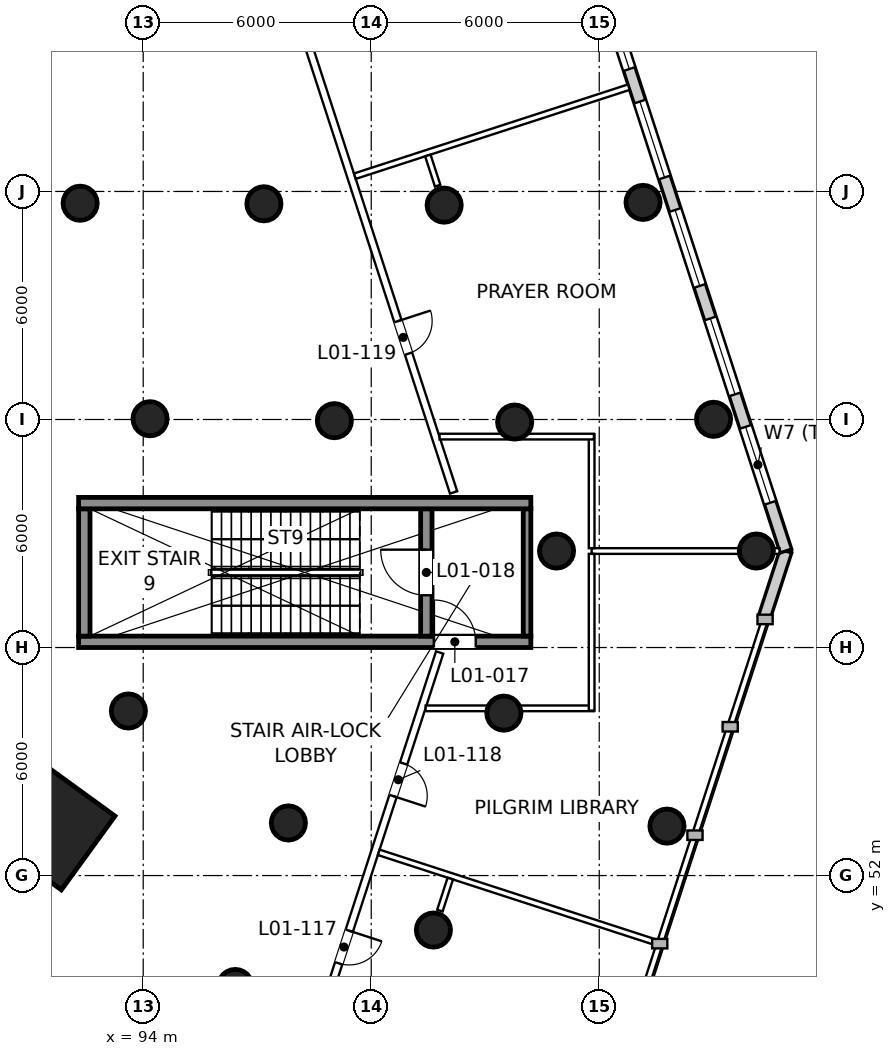
"""IFC4 building model, lengths in metres.
Left out: names, types, materials, properties, quantities, classifications, styles, units other than length and angle.
Written with IfcOpenShell. Run it as: python <this file> out.ifc"""

import sys

from ifc_helpers import new_model, si_unit, direction, frame, frame_2d, origin, origin_2d, place, context, subcontext, project, spatial, rectangle, circle, extrude, element, fill, save


model = new_model("IFC4")
c1 = context("Model", 3, precision=1e-05, world=origin(), true_north=direction((0.0, 1.0)))
c2 = subcontext(c1, "Body", "Model", "MODEL_VIEW")
j1 = project(units=[si_unit("LENGTHUNIT", "METRE"), si_unit("PLANEANGLEUNIT", "RADIAN")], contexts=[c1])
p1 = place(None, origin())
s1 = spatial("IfcSite", under=j1, at=p1, CompositionType="ELEMENT")
p2 = place(p1, origin())
s2 = spatial("IfcBuilding", under=s1, at=p2, CompositionType="ELEMENT")
p3 = place(p2, frame((0.0, 0.0, 9.0)))
s3 = spatial("IfcBuildingStorey", under=s2, at=p3, CompositionType="ELEMENT", Elevation=9.0)
p4 = place(p3, frame((91.58, 53.3, 0.0), z_axis=(0.0, 0.0, 1.0), x_axis=(0.809016994375, -0.587785252292, 0.0)))
e1 = element("IfcColumn", 1, at=p4, inside=s3, PredefinedType="COLUMN", context=c2, shape_type="SweptSolid", body=[
    extrude(rectangle(XDim=2.4, YDim=2.4, at=origin_2d()), origin(), (0.0, 0.0, 1.0), 6.0),
])
for number, where, z_axis, x_axis in (
    (2, (93.61, 56.33, 0.0), (0.0, 0.0, 1.0), (1.0, 0.0, 0.0)),
    (3, (94.18, 64.02, 0.0), (0.0, 0.0, 1.0), (1.0, 0.0, 0.0)),
    (4, (92.34, 69.69, 0.0), (0.0, 0.0, 1.0), (1.0, 0.0, 0.0)),
    (5, (107.782, 53.301, 0.0), (0.0, 0.0, 1.0), (1.0, 0.0, 0.0)),
    (6, (110.134, 60.539, 0.0), (0.0, 0.0, 1.0), (1.0, 0.0, 0.0)),
    (7, (109.008, 64.005, 0.0), (0.0, 0.0, 1.0), (1.0, 0.0, 0.0)),
    (8, (107.153, 69.712, 0.0), (0.0, 0.0, 1.0), (1.0, 0.0, 0.0)),
    (9, (101.636, 50.566, 0.0), (0.0, 0.0, 1.0), (1.0, 0.0, 0.0)),
    (10, (103.49, 56.273, 0.0), (0.0, 0.0, 1.0), (1.0, 0.0, 0.0)),
    (11, (104.876, 60.539, 0.0), (0.0, 0.0, 1.0), (1.0, 0.0, 0.0)),
    (12, (103.774, 63.933, 0.0), (0.0, 0.0, 1.0), (1.0, 0.0, 0.0)),
    (13, (101.919, 69.64, 0.0), (0.0, 0.0, 1.0), (1.0, 0.0, 0.0)),
    (14, (96.422, 49.081, 0.0), (0.0, 0.0, 1.0), (1.0, 0.0, 0.0)),
    (15, (97.82, 53.384, 0.0), (0.0, 0.0, 1.0), (1.0, 0.0, 0.0)),
    (16, (99.03, 63.969, 0.0), (0.0, 0.0, 1.0), (1.0, 0.0, 0.0)),
    (17, (97.176, 69.676, 0.0), (0.0, 0.0, 1.0), (1.0, 0.0, 0.0)),
):
    element("IfcColumn", number, at=place(p3, frame(where, z_axis=z_axis, x_axis=x_axis)), inside=s3, PredefinedType="COLUMN", context=c2, shape_type="SweptSolid", body=[
        extrude(circle(Radius=0.45, at=origin_2d()), origin(), (0.0, 0.0, 1.0), 6.0),
    ])
p5 = place(p3, frame((110.34, 58.779, 0.0), z_axis=(0.0, 0.0, 1.0), x_axis=(0.309056246022, 0.951043761766, 0.0)))
e18 = element("IfcWall", 18, at=p5, inside=s3, PredefinedType="SOLIDWALL", context=c2, shape_type="SweptSolid", body=[
    extrude(rectangle(XDim=1.851, YDim=0.32, at=frame_2d((0.925, 0.0))), origin(), (0.0, 0.0, 1.0), 5.65),
])
p6 = place(p3, frame((110.912, 60.539, 0.0), z_axis=(0.0, 0.0, 1.0), x_axis=(-0.309016476183, 0.951056684666, 0.0)))
e19 = element("IfcWall", 19, at=p6, inside=s3, PredefinedType="SOLIDWALL", context=c2, shape_type="SweptSolid", body=[
    extrude(rectangle(XDim=28.556, YDim=0.32, at=frame_2d((14.278, 0.0))), origin(), (0.0, 0.0, 1.0), 5.65),
])
p7 = place(p6, frame((1.335, 0.0, 0.9)))
e20 = element("IfcOpeningElement", 20, at=p7, cuts=e19, PredefinedType="OPENING", context=c2, shape_type="SweptSolid", body=[
    extrude(rectangle(XDim=2.1, YDim=3.0, at=frame_2d((1.05, 1.5))), frame((0.0, 0.17, 0.0), z_axis=(0.0, -1.0, 0.0), x_axis=(1.0, 0.0, 0.0)), (0.0, 0.0, 1.0), 0.34),
])
p8 = place(p6, frame((4.335, 0.0, 0.9)))
e21 = element("IfcOpeningElement", 21, at=p8, cuts=e19, PredefinedType="OPENING", context=c2, shape_type="SweptSolid", body=[
    extrude(rectangle(XDim=2.1, YDim=3.0, at=frame_2d((1.05, 1.5))), frame((0.0, 0.17, 0.0), z_axis=(0.0, -1.0, 0.0), x_axis=(1.0, 0.0, 0.0)), (0.0, 0.0, 1.0), 0.34),
])
p9 = place(p6, frame((7.335, 0.0, 0.9)))
e22 = element("IfcOpeningElement", 22, at=p9, cuts=e19, PredefinedType="OPENING", context=c2, shape_type="SweptSolid", body=[
    extrude(rectangle(XDim=2.1, YDim=3.0, at=frame_2d((1.05, 1.5))), frame((0.0, 0.17, 0.0), z_axis=(0.0, -1.0, 0.0), x_axis=(1.0, 0.0, 0.0)), (0.0, 0.0, 1.0), 0.34),
])
p10 = place(p6, frame((10.335, 0.0, 0.9)))
e23 = element("IfcOpeningElement", 23, at=p10, cuts=e19, PredefinedType="OPENING", context=c2, shape_type="SweptSolid", body=[
    extrude(rectangle(XDim=2.1, YDim=3.0, at=frame_2d((1.05, 1.5))), frame((0.0, 0.17, 0.0), z_axis=(0.0, -1.0, 0.0), x_axis=(1.0, 0.0, 0.0)), (0.0, 0.0, 1.0), 0.34),
])
p11 = place(p6, frame((13.335, 0.0, 0.9)))
e24 = element("IfcOpeningElement", 24, at=p11, cuts=e19, PredefinedType="OPENING", context=c2, shape_type="SweptSolid", body=[
    extrude(rectangle(XDim=2.1, YDim=3.0, at=frame_2d((1.05, 1.5))), frame((0.0, 0.17, 0.0), z_axis=(0.0, -1.0, 0.0), x_axis=(1.0, 0.0, 0.0)), (0.0, 0.0, 1.0), 0.34),
])
p12 = place(p6, frame((16.335, 0.0, 0.9)))
e25 = element("IfcOpeningElement", 25, at=p12, cuts=e19, PredefinedType="OPENING", context=c2, shape_type="SweptSolid", body=[
    extrude(rectangle(XDim=2.1, YDim=3.0, at=frame_2d((1.05, 1.5))), frame((0.0, 0.17, 0.0), z_axis=(0.0, -1.0, 0.0), x_axis=(1.0, 0.0, 0.0)), (0.0, 0.0, 1.0), 0.34),
])
p13 = place(p6, frame((19.335, 0.0, 0.9)))
e26 = element("IfcOpeningElement", 26, at=p13, cuts=e19, PredefinedType="OPENING", context=c2, shape_type="SweptSolid", body=[
    extrude(rectangle(XDim=2.1, YDim=3.0, at=frame_2d((1.05, 1.5))), frame((0.0, 0.17, 0.0), z_axis=(0.0, -1.0, 0.0), x_axis=(1.0, 0.0, 0.0)), (0.0, 0.0, 1.0), 0.34),
])
p14 = place(p6, frame((22.335, 0.0, 0.9)))
e27 = element("IfcOpeningElement", 27, at=p14, cuts=e19, PredefinedType="OPENING", context=c2, shape_type="SweptSolid", body=[
    extrude(rectangle(XDim=2.1, YDim=3.0, at=frame_2d((1.05, 1.5))), frame((0.0, 0.17, 0.0), z_axis=(0.0, -1.0, 0.0), x_axis=(1.0, 0.0, 0.0)), (0.0, 0.0, 1.0), 0.34),
])
p15 = place(p6, frame((25.335, 0.0, 0.9)))
e28 = element("IfcOpeningElement", 28, at=p15, cuts=e19, PredefinedType="OPENING", context=c2, shape_type="SweptSolid", body=[
    extrude(rectangle(XDim=2.1, YDim=3.0, at=frame_2d((1.05, 1.5))), frame((0.0, 0.17, 0.0), z_axis=(0.0, -1.0, 0.0), x_axis=(1.0, 0.0, 0.0)), (0.0, 0.0, 1.0), 0.34),
])
p16 = place(p3, frame((92.3, 58.15, 0.0), z_axis=(0.0, 0.0, 1.0), x_axis=(1.0, 0.0, 0.0)))
e29 = element("IfcWall", 29, at=p16, inside=s3, PredefinedType="SHEAR", context=c2, shape_type="SweptSolid", body=[
    extrude(rectangle(XDim=11.9, YDim=0.3, at=frame_2d((5.95, 0.0))), origin(), (0.0, 0.0, 1.0), 6.0),
])
p17 = place(p16, frame((9.35, 0.0, 0.0)))
e30 = element("IfcOpeningElement", 30, at=p17, cuts=e29, PredefinedType="OPENING", context=c2, shape_type="SweptSolid", body=[
    extrude(rectangle(XDim=1.1, YDim=2.1, at=frame_2d((0.55, 1.05))), frame((0.0, 0.16, 0.0), z_axis=(0.0, -1.0, 0.0), x_axis=(1.0, 0.0, 0.0)), (0.0, 0.0, 1.0), 0.32),
])
p18 = place(p3, frame((92.45, 58.3, 0.0), z_axis=(0.0, 0.0, 1.0), x_axis=(0.0, 1.0, 0.0)))
e31 = element("IfcWall", 31, at=p18, inside=s3, PredefinedType="SHEAR", context=c2, shape_type="SweptSolid", body=[
    extrude(rectangle(XDim=3.35, YDim=0.3, at=frame_2d((1.675, 0.0))), origin(), (0.0, 0.0, 1.0), 6.0),
])
p19 = place(p3, frame((101.45, 58.3, 0.0), z_axis=(0.0, 0.0, 1.0), x_axis=(0.0, 1.0, 0.0)))
e32 = element("IfcWall", 32, at=p19, inside=s3, PredefinedType="SHEAR", context=c2, shape_type="SweptSolid", body=[
    extrude(rectangle(XDim=3.35, YDim=0.3, at=frame_2d((1.675, 0.0))), origin(), (0.0, 0.0, 1.0), 6.0),
])
p20 = place(p19, frame((1.075, 0.0, 0.0)))
e33 = element("IfcOpeningElement", 33, at=p20, cuts=e32, PredefinedType="OPENING", context=c2, shape_type="SweptSolid", body=[
    extrude(rectangle(XDim=1.2, YDim=2.1, at=frame_2d((0.6, 1.05))), frame((0.0, 0.16, 0.0), z_axis=(0.0, -1.0, 0.0), x_axis=(1.0, 0.0, 0.0)), (0.0, 0.0, 1.0), 0.32),
])
p21 = place(p3, frame((104.1, 58.3, 0.0), z_axis=(0.0, 0.0, 1.0), x_axis=(0.0, 1.0, 0.0)))
e34 = element("IfcWall", 34, at=p21, inside=s3, PredefinedType="SHEAR", context=c2, shape_type="SweptSolid", body=[
    extrude(rectangle(XDim=3.35, YDim=0.2, at=frame_2d((1.675, 0.0))), origin(), (0.0, 0.0, 1.0), 6.0),
])
p22 = place(p3, frame((92.3, 61.8, 0.0), z_axis=(0.0, 0.0, 1.0), x_axis=(1.0, 0.0, 0.0)))
e35 = element("IfcWall", 35, at=p22, inside=s3, PredefinedType="SHEAR", context=c2, shape_type="SweptSolid", body=[
    extrude(rectangle(XDim=11.9, YDim=0.3, at=frame_2d((5.95, 0.0))), origin(), (0.0, 0.0, 1.0), 6.0),
])
p23 = place(p3, frame((96.368, 79.931, 0.0), z_axis=(0.0, 0.0, 1.0), x_axis=(0.309014892187, -0.951057199335, 0.0)))
e36 = element("IfcWall", 36, at=p23, inside=s3, PredefinedType="PARTITIONING", context=c2, shape_type="SweptSolid", body=[
    extrude(rectangle(XDim=18.769, YDim=0.2, at=frame_2d((9.384, 0.0))), origin(), (0.0, 0.0, 1.0), 5.65),
])
p24 = place(p23, frame((14.029, 0.0, 0.0)))
e37 = element("IfcOpeningElement", 37, at=p24, cuts=e36, PredefinedType="OPENING", context=c2, shape_type="SweptSolid", body=[
    extrude(rectangle(XDim=0.9, YDim=2.1, at=frame_2d((0.45, 1.05))), frame((0.0, 0.11, 0.0), z_axis=(0.0, -1.0, 0.0), x_axis=(1.0, 0.0, 0.0)), (0.0, 0.0, 1.0), 0.22),
])
p25 = place(p23, frame((4.54, 0.0, 0.0)))
e38 = element("IfcOpeningElement", 38, at=p25, cuts=e36, PredefinedType="OPENING", context=c2, shape_type="SweptSolid", body=[
    extrude(rectangle(XDim=0.9, YDim=2.1, at=frame_2d((0.45, 1.05))), frame((0.0, 0.11, 0.0), z_axis=(0.0, -1.0, 0.0), x_axis=(1.0, 0.0, 0.0)), (0.0, 0.0, 1.0), 0.22),
])
p26 = place(p3, frame((101.801, 57.869, 0.0), z_axis=(0.0, 0.0, 1.0), x_axis=(-0.309028648899, -0.951052729432, 0.0)))
e39 = element("IfcWall", 39, at=p26, inside=s3, PredefinedType="PARTITIONING", context=c2, shape_type="SweptSolid", body=[
    extrude(rectangle(XDim=10.767, YDim=0.2, at=frame_2d((5.384, 0.0))), origin(), (0.0, 0.0, 1.0), 5.65),
])
p27 = place(p26, frame((7.698, 0.0, 0.0)))
e40 = element("IfcOpeningElement", 40, at=p27, cuts=e39, PredefinedType="OPENING", context=c2, shape_type="SweptSolid", body=[
    extrude(rectangle(XDim=0.9, YDim=2.1, at=frame_2d((0.45, 1.05))), frame((0.0, 0.11, 0.0), z_axis=(0.0, -1.0, 0.0), x_axis=(1.0, 0.0, 0.0)), (0.0, 0.0, 1.0), 0.22),
])
p28 = place(p26, frame((3.07, 0.0, 0.0)))
e41 = element("IfcOpeningElement", 41, at=p28, cuts=e39, PredefinedType="OPENING", context=c2, shape_type="SweptSolid", body=[
    extrude(rectangle(XDim=0.9, YDim=2.1, at=frame_2d((0.45, 1.05))), frame((0.0, 0.11, 0.0), z_axis=(0.0, -1.0, 0.0), x_axis=(1.0, 0.0, 0.0)), (0.0, 0.0, 1.0), 0.22),
])
p29 = place(p3, frame((110.744, 60.539, 0.0), z_axis=(0.0, 0.0, 1.0), x_axis=(-1.0, 0.0, 0.0)))
e42 = element("IfcWall", 42, at=p29, inside=s3, PredefinedType="PARTITIONING", context=c2, shape_type="SweptSolid", body=[
    extrude(rectangle(XDim=4.944, YDim=0.15, at=frame_2d((2.472, 0.0))), origin(), (0.0, 0.0, 1.0), 5.65),
])
for number, where, z_axis, x_axis in (
    (43, (107.406, 50.269, 0.0), (0.0, 0.0, 1.0), (-0.951, 0.309, 0.0)),
    (44, (106.778, 72.744, 0.0), (0.0, 0.0, 1.0), (-0.951, -0.309, 0.0)),
):
    element("IfcWall", number, at=place(p3, frame(where, z_axis=z_axis, x_axis=x_axis)), inside=s3, PredefinedType="PARTITIONING", context=c2, shape_type="SweptSolid", body=[
        extrude(rectangle(XDim=7.58, YDim=0.15, at=frame_2d((3.79, 0.0))), origin(), (0.0, 0.0, 1.0), 4.95),
    ])
p30 = place(p3, frame((101.807, 51.078, 0.0), z_axis=(0.0, 0.0, 1.0), x_axis=(0.309023738622, 0.95105432493, 0.0)))
e45 = element("IfcWall", 45, at=p30, inside=s3, PredefinedType="PARTITIONING", context=c2, shape_type="SweptSolid", body=[
    extrude(rectangle(XDim=0.886, YDim=0.15, at=frame_2d((0.443, 0.0))), origin(), (0.0, 0.0, 1.0), 4.95),
])
p31 = place(p3, frame((101.748, 70.152, 0.0), z_axis=(0.0, 0.0, 1.0), x_axis=(-0.309033234433, 0.951051239427, 0.0)))
e46 = element("IfcWall", 46, at=p31, inside=s3, PredefinedType="PARTITIONING", context=c2, shape_type="SweptSolid", body=[
    extrude(rectangle(XDim=0.836, YDim=0.15, at=frame_2d((0.418, 0.0))), origin(), (0.0, 0.0, 1.0), 4.95),
])
p32 = place(p3, frame((105.8, 60.614, 0.0), z_axis=(0.0, 0.0, 1.0), x_axis=(0.0, 1.0, 0.0)))
e47 = element("IfcWall", 47, at=p32, inside=s3, PredefinedType="PARTITIONING", context=c2, shape_type="SweptSolid", body=[
    extrude(rectangle(XDim=2.996, YDim=0.15, at=frame_2d((1.498, 0.0))), origin(), (0.0, 0.0, 1.0), 5.65),
])
p33 = place(p3, frame((105.86, 63.55, 0.0), z_axis=(0.0, 0.0, 1.0), x_axis=(-1.0, 0.0, 0.0)))
e48 = element("IfcWall", 48, at=p33, inside=s3, PredefinedType="PARTITIONING", context=c2, shape_type="SweptSolid", body=[
    extrude(rectangle(XDim=4.062, YDim=0.15, at=frame_2d((2.031, 0.0))), origin(), (0.0, 0.0, 1.0), 5.65),
])
p34 = place(p3, frame((101.432, 56.4, 0.0), z_axis=(0.0, 0.0, 1.0), x_axis=(1.0, 0.0, 0.0)))
e49 = element("IfcWall", 49, at=p34, inside=s3, PredefinedType="PARTITIONING", context=c2, shape_type="SweptSolid", body=[
    extrude(rectangle(XDim=4.428, YDim=0.15, at=frame_2d((2.214, 0.0))), origin(), (0.0, 0.0, 1.0), 5.65),
])
p35 = place(p3, frame((105.8, 56.34, 0.0), z_axis=(0.0, 0.0, 1.0), x_axis=(0.0, 1.0, 0.0)))
e50 = element("IfcWall", 50, at=p35, inside=s3, PredefinedType="PARTITIONING", context=c2, shape_type="SweptSolid", body=[
    extrude(rectangle(XDim=4.124, YDim=0.15, at=frame_2d((2.062, 0.0))), origin(), (0.0, 0.0, 1.0), 5.65),
])
p36 = place(p7, origin())
e51 = element("IfcWindow", 51, at=p36, inside=s3, PartitioningType="SINGLE_PANEL", PredefinedType="WINDOW", context=c2, shape_type="SweptSolid", body=[
    extrude(rectangle(XDim=2.1, YDim=3.0, at=frame_2d((1.05, 1.5))), frame((0.0, 0.07, 0.0), z_axis=(0.0, -1.0, 0.0), x_axis=(1.0, 0.0, 0.0)), (0.0, 0.0, 1.0), 0.06),
])
fill(e20, e51)
p37 = place(p8, origin())
e52 = element("IfcWindow", 52, at=p37, inside=s3, PartitioningType="SINGLE_PANEL", PredefinedType="WINDOW", context=c2, shape_type="SweptSolid", body=[
    extrude(rectangle(XDim=2.1, YDim=3.0, at=frame_2d((1.05, 1.5))), frame((0.0, 0.07, 0.0), z_axis=(0.0, -1.0, 0.0), x_axis=(1.0, 0.0, 0.0)), (0.0, 0.0, 1.0), 0.06),
])
fill(e21, e52)
p38 = place(p9, origin())
e53 = element("IfcWindow", 53, at=p38, inside=s3, PartitioningType="SINGLE_PANEL", PredefinedType="WINDOW", context=c2, shape_type="SweptSolid", body=[
    extrude(rectangle(XDim=2.1, YDim=3.0, at=frame_2d((1.05, 1.5))), frame((0.0, 0.07, 0.0), z_axis=(0.0, -1.0, 0.0), x_axis=(1.0, 0.0, 0.0)), (0.0, 0.0, 1.0), 0.06),
])
fill(e22, e53)
p39 = place(p10, origin())
e54 = element("IfcWindow", 54, at=p39, inside=s3, PartitioningType="SINGLE_PANEL", PredefinedType="WINDOW", context=c2, shape_type="SweptSolid", body=[
    extrude(rectangle(XDim=2.1, YDim=3.0, at=frame_2d((1.05, 1.5))), frame((0.0, 0.07, 0.0), z_axis=(0.0, -1.0, 0.0), x_axis=(1.0, 0.0, 0.0)), (0.0, 0.0, 1.0), 0.06),
])
fill(e23, e54)
p40 = place(p11, origin())
e55 = element("IfcWindow", 55, at=p40, inside=s3, PartitioningType="SINGLE_PANEL", PredefinedType="WINDOW", context=c2, shape_type="SweptSolid", body=[
    extrude(rectangle(XDim=2.1, YDim=3.0, at=frame_2d((1.05, 1.5))), frame((0.0, 0.07, 0.0), z_axis=(0.0, -1.0, 0.0), x_axis=(1.0, 0.0, 0.0)), (0.0, 0.0, 1.0), 0.06),
])
fill(e24, e55)
p41 = place(p17, origin())
e56 = element("IfcDoor", 56, at=p41, inside=s3, OperationType="SINGLE_SWING_LEFT", PredefinedType="DOOR", context=c2, shape_type="SweptSolid", body=[
    extrude(rectangle(XDim=1.1, YDim=2.1, at=frame_2d((0.55, 1.05))), frame((0.0, 0.025, 0.0), z_axis=(0.0, -1.0, 0.0), x_axis=(1.0, 0.0, 0.0)), (0.0, 0.0, 1.0), 0.05),
])
fill(e30, e56)
p42 = place(p20, origin())
e57 = element("IfcDoor", 57, at=p42, inside=s3, OperationType="SINGLE_SWING_RIGHT", PredefinedType="DOOR", context=c2, shape_type="SweptSolid", body=[
    extrude(rectangle(XDim=1.2, YDim=2.1, at=frame_2d((0.6, 1.05))), frame((0.0, 0.025, 0.0), z_axis=(0.0, -1.0, 0.0), x_axis=(1.0, 0.0, 0.0)), (0.0, 0.0, 1.0), 0.05),
])
fill(e33, e57)
p43 = place(p27, origin())
e58 = element("IfcDoor", 58, at=p43, inside=s3, OperationType="SINGLE_SWING_LEFT", PredefinedType="DOOR", context=c2, shape_type="SweptSolid", body=[
    extrude(rectangle(XDim=0.9, YDim=2.1, at=frame_2d((0.45, 1.05))), frame((0.0, 0.025, 0.0), z_axis=(0.0, -1.0, 0.0), x_axis=(1.0, 0.0, 0.0)), (0.0, 0.0, 1.0), 0.05),
])
fill(e40, e58)
p44 = place(p28, origin())
e59 = element("IfcDoor", 59, at=p44, inside=s3, OperationType="SINGLE_SWING_RIGHT", PredefinedType="DOOR", context=c2, shape_type="SweptSolid", body=[
    extrude(rectangle(XDim=0.9, YDim=2.1, at=frame_2d((0.45, 1.05))), frame((0.0, 0.025, 0.0), z_axis=(0.0, -1.0, 0.0), x_axis=(1.0, 0.0, 0.0)), (0.0, 0.0, 1.0), 0.05),
])
fill(e41, e59)
p45 = place(p24, origin())
e60 = element("IfcDoor", 60, at=p45, inside=s3, OperationType="SINGLE_SWING_LEFT", PredefinedType="DOOR", context=c2, shape_type="SweptSolid", body=[
    extrude(rectangle(XDim=0.9, YDim=2.1, at=frame_2d((0.45, 1.05))), frame((0.0, 0.025, 0.0), z_axis=(0.0, -1.0, 0.0), x_axis=(1.0, 0.0, 0.0)), (0.0, 0.0, 1.0), 0.05),
])
fill(e37, e60)
save(model, sys.argv[1])
